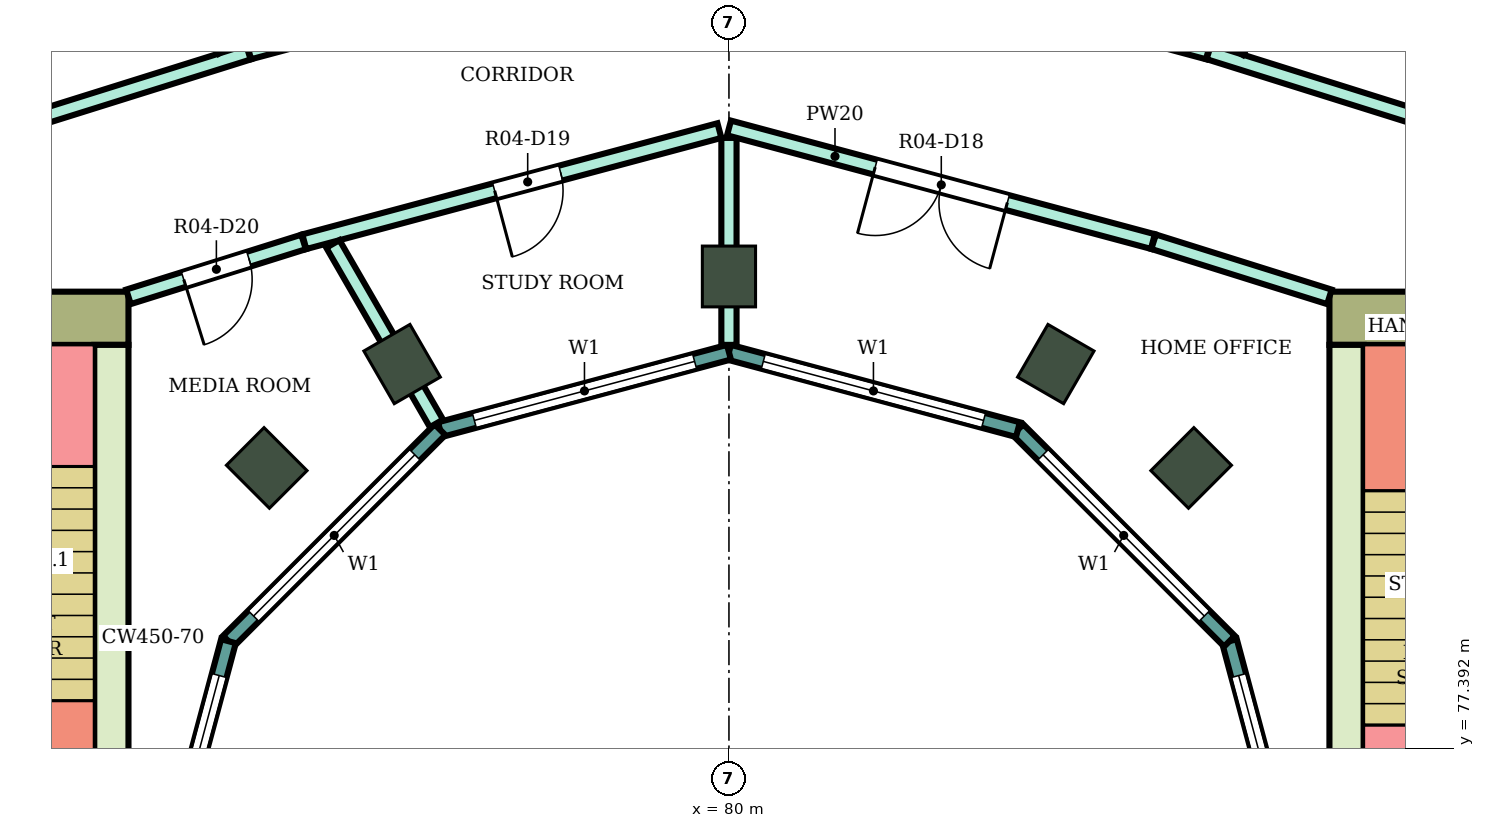
"""IFC4 building model, lengths in metres.
Left out: names, types, materials, properties, quantities, classifications, styles, units other than length and angle.
Written with IfcOpenShell. Run it as: python <this file> out.ifc"""

import sys

from ifc_helpers import new_model, si_unit, direction, frame, frame_2d, origin, origin_2d, place, context, subcontext, project, spatial, rectangle, extrude, element, fill, save


model = new_model("IFC4")
c1 = context("Model", 3, precision=1e-05, world=origin(), true_north=direction((0.0, 1.0)))
c2 = subcontext(c1, "Body", "Model", "MODEL_VIEW")
j1 = project(units=[si_unit("LENGTHUNIT", "METRE"), si_unit("PLANEANGLEUNIT", "RADIAN")], contexts=[c1])
p1 = place(None, origin())
s1 = spatial("IfcSite", under=j1, at=p1, CompositionType="ELEMENT")
p2 = place(p1, origin())
s2 = spatial("IfcBuilding", under=s1, at=p2, CompositionType="ELEMENT")
p3 = place(p2, frame((0.0, 0.0, 194.6)))
s3 = spatial("IfcBuildingStorey", under=s2, at=p3, CompositionType="ELEMENT", Elevation=194.6)
for number, where, z_axis, x_axis in (
    (1, (86.081, 81.081, 0.0), (0.0, 0.0, 1.0), (0.707, 0.707, 0.0)),
    (2, (84.3, 82.448, 0.0), (0.0, 0.0, 1.0), (0.5, 0.866, 0.0)),
    (3, (80.0, 83.6, 0.0), (0.0, 0.0, 1.0), (0.0, 1.0, 0.0)),
    (4, (75.7, 82.448, 0.0), (0.0, 0.0, 1.0), (-0.5, 0.866, 0.0)),
    (5, (73.919, 81.081, 0.0), (0.0, 0.0, 1.0), (-0.707, 0.707, 0.0)),
):
    element("IfcColumn", number, at=place(p3, frame(where, z_axis=z_axis, x_axis=x_axis)), inside=s3, PredefinedType="COLUMN", context=c2, shape_type="SweptSolid", body=[
        extrude(rectangle(XDim=0.8, YDim=0.7, at=origin_2d()), origin(), (0.0, 0.0, 1.0), 4.1),
    ])
p4 = place(p3, frame((87.9, 83.05, 0.0), z_axis=(0.0, 0.0, 1.0), x_axis=(1.0, 0.0, 0.0)))
e6 = element("IfcWall", 6, at=p4, inside=s3, PredefinedType="SHEAR", context=c2, shape_type="SweptSolid", body=[
    extrude(rectangle(XDim=14.8, YDim=0.7, at=frame_2d((7.4, 0.0))), origin(), (0.0, 0.0, 1.0), 3.78),
])
p5 = place(p4, frame((4.2, 0.0, 0.0)))
e7 = element("IfcOpeningElement", 7, at=p5, cuts=e6, PredefinedType="OPENING", context=c2, shape_type="SweptSolid", body=[
    extrude(rectangle(XDim=2.4, YDim=2.4, at=frame_2d((1.2, 1.2))), frame((0.0, 0.36, 0.0), z_axis=(0.0, -1.0, 0.0), x_axis=(1.0, 0.0, 0.0)), (0.0, 0.0, 1.0), 0.72),
])
p6 = place(p3, frame((88.125, 75.0, 0.0), z_axis=(0.0, 0.0, 1.0), x_axis=(0.0, 1.0, 0.0)))
e8 = element("IfcWall", 8, at=p6, inside=s3, PredefinedType="SHEAR", context=c2, shape_type="SweptSolid", body=[
    extrude(rectangle(XDim=7.7, YDim=0.45, at=frame_2d((3.85, 0.0))), origin(), (0.0, 0.0, 1.0), 3.78),
])
p7 = place(p3, frame((72.1, 83.05, 0.0), z_axis=(0.0, 0.0, 1.0), x_axis=(-1.0, 0.0, 0.0)))
e9 = element("IfcWall", 9, at=p7, inside=s3, PredefinedType="SHEAR", context=c2, shape_type="SweptSolid", body=[
    extrude(rectangle(XDim=14.8, YDim=0.7, at=frame_2d((7.4, 0.0))), origin(), (0.0, 0.0, 1.0), 3.78),
])
p8 = place(p7, frame((4.2, 0.0, 0.0)))
e10 = element("IfcOpeningElement", 10, at=p8, cuts=e9, PredefinedType="OPENING", context=c2, shape_type="SweptSolid", body=[
    extrude(rectangle(XDim=2.4, YDim=2.4, at=frame_2d((1.2, 1.2))), frame((0.0, 0.36, 0.0), z_axis=(0.0, -1.0, 0.0), x_axis=(1.0, 0.0, 0.0)), (0.0, 0.0, 1.0), 0.72),
])
p9 = place(p3, frame((71.875, 82.7, 0.0), z_axis=(0.0, 0.0, 1.0), x_axis=(0.0, -1.0, 0.0)))
e11 = element("IfcWall", 11, at=p9, inside=s3, PredefinedType="SHEAR", context=c2, shape_type="SweptSolid", body=[
    extrude(rectangle(XDim=7.7, YDim=0.45, at=frame_2d((3.85, 0.0))), origin(), (0.0, 0.0, 1.0), 3.78),
])
p10 = place(p3, frame((87.604, 75.0, 0.0), z_axis=(0.0, 0.0, 1.0), x_axis=(-0.258789828301, 0.965933654434, 0.0)))
e12 = element("IfcWall", 12, at=p10, inside=s3, PredefinedType="NOTDEFINED", context=c2, shape_type="SweptSolid", body=[
    extrude(rectangle(XDim=3.936, YDim=0.2, at=frame_2d((1.968, 0.0))), origin(), (0.0, 0.0, 1.0), 4.1),
])
p11 = place(p10, frame((0.468, 0.0, 0.9)))
e13 = element("IfcOpeningElement", 13, at=p11, cuts=e12, PredefinedType="OPENING", context=c2, shape_type="SweptSolid", body=[
    extrude(rectangle(XDim=3.0, YDim=2.3, at=frame_2d((1.5, 1.15))), frame((0.0, 0.11, 0.0), z_axis=(0.0, -1.0, 0.0), x_axis=(1.0, 0.0, 0.0)), (0.0, 0.0, 1.0), 0.22),
])
p12 = place(p3, frame((86.585, 78.802, 0.0), z_axis=(0.0, 0.0, 1.0), x_axis=(-0.707106781187, 0.707106781187, 0.0)))
e14 = element("IfcWall", 14, at=p12, inside=s3, PredefinedType="NOTDEFINED", context=c2, shape_type="SweptSolid", body=[
    extrude(rectangle(XDim=3.936, YDim=0.2, at=frame_2d((1.968, 0.0))), origin(), (0.0, 0.0, 1.0), 4.1),
])
p13 = place(p12, frame((0.468, 0.0, 0.9)))
e15 = element("IfcOpeningElement", 15, at=p13, cuts=e14, PredefinedType="OPENING", context=c2, shape_type="SweptSolid", body=[
    extrude(rectangle(XDim=3.0, YDim=2.3, at=frame_2d((1.5, 1.15))), frame((0.0, 0.11, 0.0), z_axis=(0.0, -1.0, 0.0), x_axis=(1.0, 0.0, 0.0)), (0.0, 0.0, 1.0), 0.22),
])
p14 = place(p3, frame((83.802, 81.585, 0.0), z_axis=(0.0, 0.0, 1.0), x_axis=(-0.965933654434, 0.258789828301, 0.0)))
e16 = element("IfcWall", 16, at=p14, inside=s3, PredefinedType="NOTDEFINED", context=c2, shape_type="SweptSolid", body=[
    extrude(rectangle(XDim=3.936, YDim=0.2, at=frame_2d((1.968, 0.0))), origin(), (0.0, 0.0, 1.0), 4.1),
])
p15 = place(p14, frame((0.468, 0.0, 0.9)))
e17 = element("IfcOpeningElement", 17, at=p15, cuts=e16, PredefinedType="OPENING", context=c2, shape_type="SweptSolid", body=[
    extrude(rectangle(XDim=3.0, YDim=2.3, at=frame_2d((1.5, 1.15))), frame((0.0, 0.11, 0.0), z_axis=(0.0, -1.0, 0.0), x_axis=(1.0, 0.0, 0.0)), (0.0, 0.0, 1.0), 0.22),
])
p16 = place(p3, frame((80.0, 82.604, 0.0), z_axis=(0.0, 0.0, 1.0), x_axis=(-0.965933654434, -0.258789828301, 0.0)))
e18 = element("IfcWall", 18, at=p16, inside=s3, PredefinedType="NOTDEFINED", context=c2, shape_type="SweptSolid", body=[
    extrude(rectangle(XDim=3.936, YDim=0.2, at=frame_2d((1.968, 0.0))), origin(), (0.0, 0.0, 1.0), 4.1),
])
p17 = place(p16, frame((0.468, 0.0, 0.9)))
e19 = element("IfcOpeningElement", 19, at=p17, cuts=e18, PredefinedType="OPENING", context=c2, shape_type="SweptSolid", body=[
    extrude(rectangle(XDim=3.0, YDim=2.3, at=frame_2d((1.5, 1.15))), frame((0.0, 0.11, 0.0), z_axis=(0.0, -1.0, 0.0), x_axis=(1.0, 0.0, 0.0)), (0.0, 0.0, 1.0), 0.22),
])
p18 = place(p3, frame((76.198, 81.585, 0.0), z_axis=(0.0, 0.0, 1.0), x_axis=(-0.707106781187, -0.707106781187, 0.0)))
e20 = element("IfcWall", 20, at=p18, inside=s3, PredefinedType="NOTDEFINED", context=c2, shape_type="SweptSolid", body=[
    extrude(rectangle(XDim=3.936, YDim=0.2, at=frame_2d((1.968, 0.0))), origin(), (0.0, 0.0, 1.0), 4.1),
])
p19 = place(p18, frame((0.468, 0.0, 0.9)))
e21 = element("IfcOpeningElement", 21, at=p19, cuts=e20, PredefinedType="OPENING", context=c2, shape_type="SweptSolid", body=[
    extrude(rectangle(XDim=3.0, YDim=2.3, at=frame_2d((1.5, 1.15))), frame((0.0, 0.11, 0.0), z_axis=(0.0, -1.0, 0.0), x_axis=(1.0, 0.0, 0.0)), (0.0, 0.0, 1.0), 0.22),
])
p20 = place(p3, frame((73.415, 78.802, 0.0), z_axis=(0.0, 0.0, 1.0), x_axis=(-0.258789828301, -0.965933654434, 0.0)))
e22 = element("IfcWall", 22, at=p20, inside=s3, PredefinedType="NOTDEFINED", context=c2, shape_type="SweptSolid", body=[
    extrude(rectangle(XDim=3.936, YDim=0.2, at=frame_2d((1.968, 0.0))), origin(), (0.0, 0.0, 1.0), 4.1),
])
p21 = place(p20, frame((0.468, 0.0, 0.9)))
e23 = element("IfcOpeningElement", 23, at=p21, cuts=e22, PredefinedType="OPENING", context=c2, shape_type="SweptSolid", body=[
    extrude(rectangle(XDim=3.0, YDim=2.3, at=frame_2d((1.5, 1.15))), frame((0.0, 0.11, 0.0), z_axis=(0.0, -1.0, 0.0), x_axis=(1.0, 0.0, 0.0)), (0.0, 0.0, 1.0), 0.22),
])
p22 = place(p3, frame((68.2, 84.834, 0.0), z_axis=(0.0, 0.0, 1.0), x_axis=(0.954272398161, 0.298938438661, 0.0)))
e24 = element("IfcWall", 24, at=p22, inside=s3, PredefinedType="PARTITIONING", context=c2, shape_type="SweptSolid", body=[
    extrude(rectangle(XDim=5.74, YDim=0.2, at=frame_2d((2.87, 0.0))), origin(), (0.0, 0.0, 1.0), 3.65),
])
p23 = place(p3, frame((72.1, 83.332, 0.0), z_axis=(0.0, 0.0, 1.0), x_axis=(0.954233106619, 0.299063836383, 0.0)))
e25 = element("IfcWall", 25, at=p23, inside=s3, PredefinedType="PARTITIONING", context=c2, shape_type="SweptSolid", body=[
    extrude(rectangle(XDim=2.414, YDim=0.2, at=frame_2d((1.207, 0.0))), origin(), (0.0, 0.0, 1.0), 3.65),
])
p24 = place(p23, frame((0.762, 0.0, 0.0)))
e26 = element("IfcOpeningElement", 26, at=p24, cuts=e25, PredefinedType="OPENING", context=c2, shape_type="SweptSolid", body=[
    extrude(rectangle(XDim=0.9, YDim=2.1, at=frame_2d((0.45, 1.05))), frame((0.0, 0.11, 0.0), z_axis=(0.0, -1.0, 0.0), x_axis=(1.0, 0.0, 0.0)), (0.0, 0.0, 1.0), 0.22),
])
p25 = place(p3, frame((73.687, 86.554, 0.0), z_axis=(0.0, 0.0, 1.0), x_axis=(0.96595258731, 0.258719150952, 0.0)))
e27 = element("IfcWall", 27, at=p25, inside=s3, PredefinedType="PARTITIONING", context=c2, shape_type="SweptSolid", body=[
    extrude(rectangle(XDim=6.486, YDim=0.2, at=frame_2d((3.243, 0.0))), origin(), (0.0, 0.0, 1.0), 3.65),
])
p26 = place(p25, frame((0.55, 0.0, 0.0)))
e28 = element("IfcOpeningElement", 28, at=p26, cuts=e27, PredefinedType="OPENING", context=c2, shape_type="SweptSolid", body=[
    extrude(rectangle(XDim=1.0, YDim=2.1, at=frame_2d((0.5, 1.05))), frame((0.0, 0.11, 0.0), z_axis=(0.0, -1.0, 0.0), x_axis=(1.0, 0.0, 0.0)), (0.0, 0.0, 1.0), 0.22),
])
p27 = place(p3, frame((74.413, 84.057, 0.0), z_axis=(0.0, 0.0, 1.0), x_axis=(0.965972135939, 0.258646153246, 0.0)))
e29 = element("IfcWall", 29, at=p27, inside=s3, PredefinedType="PARTITIONING", context=c2, shape_type="SweptSolid", body=[
    extrude(rectangle(XDim=5.654, YDim=0.2, at=frame_2d((2.827, 0.0))), origin(), (0.0, 0.0, 1.0), 3.65),
])
p28 = place(p27, frame((2.593, 0.0, 0.0)))
e30 = element("IfcOpeningElement", 30, at=p28, cuts=e29, PredefinedType="OPENING", context=c2, shape_type="SweptSolid", body=[
    extrude(rectangle(XDim=0.9, YDim=2.1, at=frame_2d((0.45, 1.05))), frame((0.0, 0.11, 0.0), z_axis=(0.0, -1.0, 0.0), x_axis=(1.0, 0.0, 0.0)), (0.0, 0.0, 1.0), 0.22),
])
p29 = place(p3, frame((74.789, 84.028, 0.0), z_axis=(0.0, 0.0, 1.0), x_axis=(0.49993436518, -0.866063294749, 0.0)))
e31 = element("IfcWall", 31, at=p29, inside=s3, PredefinedType="PARTITIONING", context=c2, shape_type="SweptSolid", body=[
    extrude(rectangle(XDim=2.726, YDim=0.2, at=frame_2d((1.363, 0.0))), origin(), (0.0, 0.0, 1.0), 3.65),
])
p30 = place(p3, frame((80.0, 82.7, 0.0), z_axis=(0.0, 0.0, 1.0), x_axis=(0.0, 1.0, 0.0)))
e32 = element("IfcWall", 32, at=p30, inside=s3, PredefinedType="PARTITIONING", context=c2, shape_type="SweptSolid", body=[
    extrude(rectangle(XDim=2.723, YDim=0.2, at=frame_2d((1.362, 0.0))), origin(), (0.0, 0.0, 1.0), 3.65),
])
p31 = place(p3, frame((80.048, 88.233, 0.0), z_axis=(0.0, 0.0, 1.0), x_axis=(0.965787353661, -0.259335280109, 0.0)))
e33 = element("IfcWall", 33, at=p31, inside=s3, PredefinedType="PARTITIONING", context=c2, shape_type="SweptSolid", body=[
    extrude(rectangle(XDim=6.476, YDim=0.2, at=frame_2d((3.238, 0.0))), origin(), (0.0, 0.0, 1.0), 3.65),
])
p32 = place(p31, frame((4.936, 0.0, 0.0)))
e34 = element("IfcOpeningElement", 34, at=p32, cuts=e33, PredefinedType="OPENING", context=c2, shape_type="SweptSolid", body=[
    extrude(rectangle(XDim=1.0, YDim=2.1, at=frame_2d((0.5, 1.05))), frame((0.0, 0.11, 0.0), z_axis=(0.0, -1.0, 0.0), x_axis=(1.0, 0.0, 0.0)), (0.0, 0.0, 1.0), 0.22),
])
p33 = place(p3, frame((80.001, 85.554, 0.0), z_axis=(0.0, 0.0, 1.0), x_axis=(0.965917658836, -0.258849524528, 0.0)))
e35 = element("IfcWall", 35, at=p33, inside=s3, PredefinedType="PARTITIONING", context=c2, shape_type="SweptSolid", body=[
    extrude(rectangle(XDim=5.773, YDim=0.2, at=frame_2d((2.887, 0.0))), origin(), (0.0, 0.0, 1.0), 3.65),
])
p34 = place(p33, frame((1.991, 0.0, 0.0)))
e36 = element("IfcOpeningElement", 36, at=p34, cuts=e35, PredefinedType="OPENING", context=c2, shape_type="SweptSolid", body=[
    extrude(rectangle(XDim=1.8, YDim=2.1, at=frame_2d((0.9, 1.05))), frame((0.0, 0.11, 0.0), z_axis=(0.0, -1.0, 0.0), x_axis=(1.0, 0.0, 0.0)), (0.0, 0.0, 1.0), 0.22),
])
p35 = place(p3, frame((85.587, 84.057, 0.0), z_axis=(0.0, 0.0, 1.0), x_axis=(0.954210767728, -0.299135104513, 0.0)))
e37 = element("IfcWall", 37, at=p35, inside=s3, PredefinedType="PARTITIONING", context=c2, shape_type="SweptSolid", body=[
    extrude(rectangle(XDim=2.424, YDim=0.2, at=frame_2d((1.212, 0.0))), origin(), (0.0, 0.0, 1.0), 3.65),
])
p36 = place(p3, frame((86.313, 86.554, 0.0), z_axis=(0.0, 0.0, 1.0), x_axis=(0.954081217458, -0.299548043717, 0.0)))
e38 = element("IfcWall", 38, at=p36, inside=s3, PredefinedType="PARTITIONING", context=c2, shape_type="SweptSolid", body=[
    extrude(rectangle(XDim=5.721, YDim=0.2, at=frame_2d((2.86, 0.0))), origin(), (0.0, 0.0, 1.0), 3.65),
])
p37 = place(p3, frame((86.676, 86.563, 0.0), z_axis=(0.0, 0.0, 1.0), x_axis=(0.500124310661, 0.865953621094, 0.0)))
e39 = element("IfcWall", 39, at=p37, inside=s3, PredefinedType="PARTITIONING", context=c2, shape_type="SweptSolid", body=[
    extrude(rectangle(XDim=12.446, YDim=0.2, at=frame_2d((6.223, 0.0))), origin(), (0.0, 0.0, 1.0), 3.65),
])
p38 = place(p3, frame((67.101, 97.342, 0.0), z_axis=(0.0, 0.0, 1.0), x_axis=(0.499944152966, -0.866057644684, 0.0)))
e40 = element("IfcWall", 40, at=p38, inside=s3, PredefinedType="PARTITIONING", context=c2, shape_type="SweptSolid", body=[
    extrude(rectangle(XDim=12.456, YDim=0.1, at=frame_2d((6.228, 0.0))), origin(), (0.0, 0.0, 1.0), 3.65),
])
p39 = place(p38, frame((2.486, 0.0, 0.0)))
e41 = element("IfcOpeningElement", 41, at=p39, cuts=e40, PredefinedType="OPENING", context=c2, shape_type="SweptSolid", body=[
    extrude(rectangle(XDim=0.9, YDim=2.1, at=frame_2d((0.45, 1.05))), frame((0.0, 0.06, 0.0), z_axis=(0.0, -1.0, 0.0), x_axis=(1.0, 0.0, 0.0)), (0.0, 0.0, 1.0), 0.12),
])
p40 = place(p38, frame((9.85, 0.0, 0.0)))
e42 = element("IfcOpeningElement", 42, at=p40, cuts=e40, PredefinedType="OPENING", context=c2, shape_type="SweptSolid", body=[
    extrude(rectangle(XDim=0.8, YDim=2.1, at=frame_2d((0.4, 1.05))), frame((0.0, 0.06, 0.0), z_axis=(0.0, -1.0, 0.0), x_axis=(1.0, 0.0, 0.0)), (0.0, 0.0, 1.0), 0.12),
])
p41 = place(p11, origin())
e43 = element("IfcWindow", 43, at=p41, inside=s3, PartitioningType="SINGLE_PANEL", PredefinedType="WINDOW", context=c2, shape_type="SweptSolid", body=[
    extrude(rectangle(XDim=3.0, YDim=2.3, at=frame_2d((1.5, 1.15))), frame((0.0, 0.03, 0.0), z_axis=(0.0, -1.0, 0.0), x_axis=(1.0, 0.0, 0.0)), (0.0, 0.0, 1.0), 0.06),
])
fill(e13, e43)
p42 = place(p13, origin())
e44 = element("IfcWindow", 44, at=p42, inside=s3, PartitioningType="SINGLE_PANEL", PredefinedType="WINDOW", context=c2, shape_type="SweptSolid", body=[
    extrude(rectangle(XDim=3.0, YDim=2.3, at=frame_2d((1.5, 1.15))), frame((0.0, 0.03, 0.0), z_axis=(0.0, -1.0, 0.0), x_axis=(1.0, 0.0, 0.0)), (0.0, 0.0, 1.0), 0.06),
])
fill(e15, e44)
p43 = place(p15, origin())
e45 = element("IfcWindow", 45, at=p43, inside=s3, PartitioningType="SINGLE_PANEL", PredefinedType="WINDOW", context=c2, shape_type="SweptSolid", body=[
    extrude(rectangle(XDim=3.0, YDim=2.3, at=frame_2d((1.5, 1.15))), frame((0.0, 0.03, 0.0), z_axis=(0.0, -1.0, 0.0), x_axis=(1.0, 0.0, 0.0)), (0.0, 0.0, 1.0), 0.06),
])
fill(e17, e45)
p44 = place(p17, origin())
e46 = element("IfcWindow", 46, at=p44, inside=s3, PartitioningType="SINGLE_PANEL", PredefinedType="WINDOW", context=c2, shape_type="SweptSolid", body=[
    extrude(rectangle(XDim=3.0, YDim=2.3, at=frame_2d((1.5, 1.15))), frame((0.0, 0.03, 0.0), z_axis=(0.0, -1.0, 0.0), x_axis=(1.0, 0.0, 0.0)), (0.0, 0.0, 1.0), 0.06),
])
fill(e19, e46)
p45 = place(p19, origin())
e47 = element("IfcWindow", 47, at=p45, inside=s3, PartitioningType="SINGLE_PANEL", PredefinedType="WINDOW", context=c2, shape_type="SweptSolid", body=[
    extrude(rectangle(XDim=3.0, YDim=2.3, at=frame_2d((1.5, 1.15))), frame((0.0, 0.03, 0.0), z_axis=(0.0, -1.0, 0.0), x_axis=(1.0, 0.0, 0.0)), (0.0, 0.0, 1.0), 0.06),
])
fill(e21, e47)
p46 = place(p21, origin())
e48 = element("IfcWindow", 48, at=p46, inside=s3, PartitioningType="SINGLE_PANEL", PredefinedType="WINDOW", context=c2, shape_type="SweptSolid", body=[
    extrude(rectangle(XDim=3.0, YDim=2.3, at=frame_2d((1.5, 1.15))), frame((0.0, 0.03, 0.0), z_axis=(0.0, -1.0, 0.0), x_axis=(1.0, 0.0, 0.0)), (0.0, 0.0, 1.0), 0.06),
])
fill(e23, e48)
p47 = place(p34, frame((1.8, 0.0, 0.0), z_axis=(0.0, 0.0, 1.0), x_axis=(-1.0, 0.0, 0.0)))
e49 = element("IfcDoor", 49, at=p47, inside=s3, OperationType="DOUBLE_DOOR_SINGLE_SWING", PredefinedType="DOOR", context=c2, shape_type="SweptSolid", body=[
    extrude(rectangle(XDim=1.8, YDim=2.1, at=frame_2d((0.9, 1.05))), frame((0.0, 0.025, 0.0), z_axis=(0.0, -1.0, 0.0), x_axis=(1.0, 0.0, 0.0)), (0.0, 0.0, 1.0), 0.05),
])
fill(e36, e49)
p48 = place(p28, frame((0.9, 0.0, 0.0), z_axis=(0.0, 0.0, 1.0), x_axis=(-1.0, 0.0, 0.0)))
e50 = element("IfcDoor", 50, at=p48, inside=s3, OperationType="SINGLE_SWING_RIGHT", PredefinedType="DOOR", context=c2, shape_type="SweptSolid", body=[
    extrude(rectangle(XDim=0.9, YDim=2.1, at=frame_2d((0.45, 1.05))), frame((0.0, 0.025, 0.0), z_axis=(0.0, -1.0, 0.0), x_axis=(1.0, 0.0, 0.0)), (0.0, 0.0, 1.0), 0.05),
])
fill(e30, e50)
p49 = place(p24, frame((0.9, 0.0, 0.0), z_axis=(0.0, 0.0, 1.0), x_axis=(-1.0, 0.0, 0.0)))
e51 = element("IfcDoor", 51, at=p49, inside=s3, OperationType="SINGLE_SWING_RIGHT", PredefinedType="DOOR", context=c2, shape_type="SweptSolid", body=[
    extrude(rectangle(XDim=0.9, YDim=2.1, at=frame_2d((0.45, 1.05))), frame((0.0, 0.025, 0.0), z_axis=(0.0, -1.0, 0.0), x_axis=(1.0, 0.0, 0.0)), (0.0, 0.0, 1.0), 0.05),
])
fill(e26, e51)
save(model, sys.argv[1])
